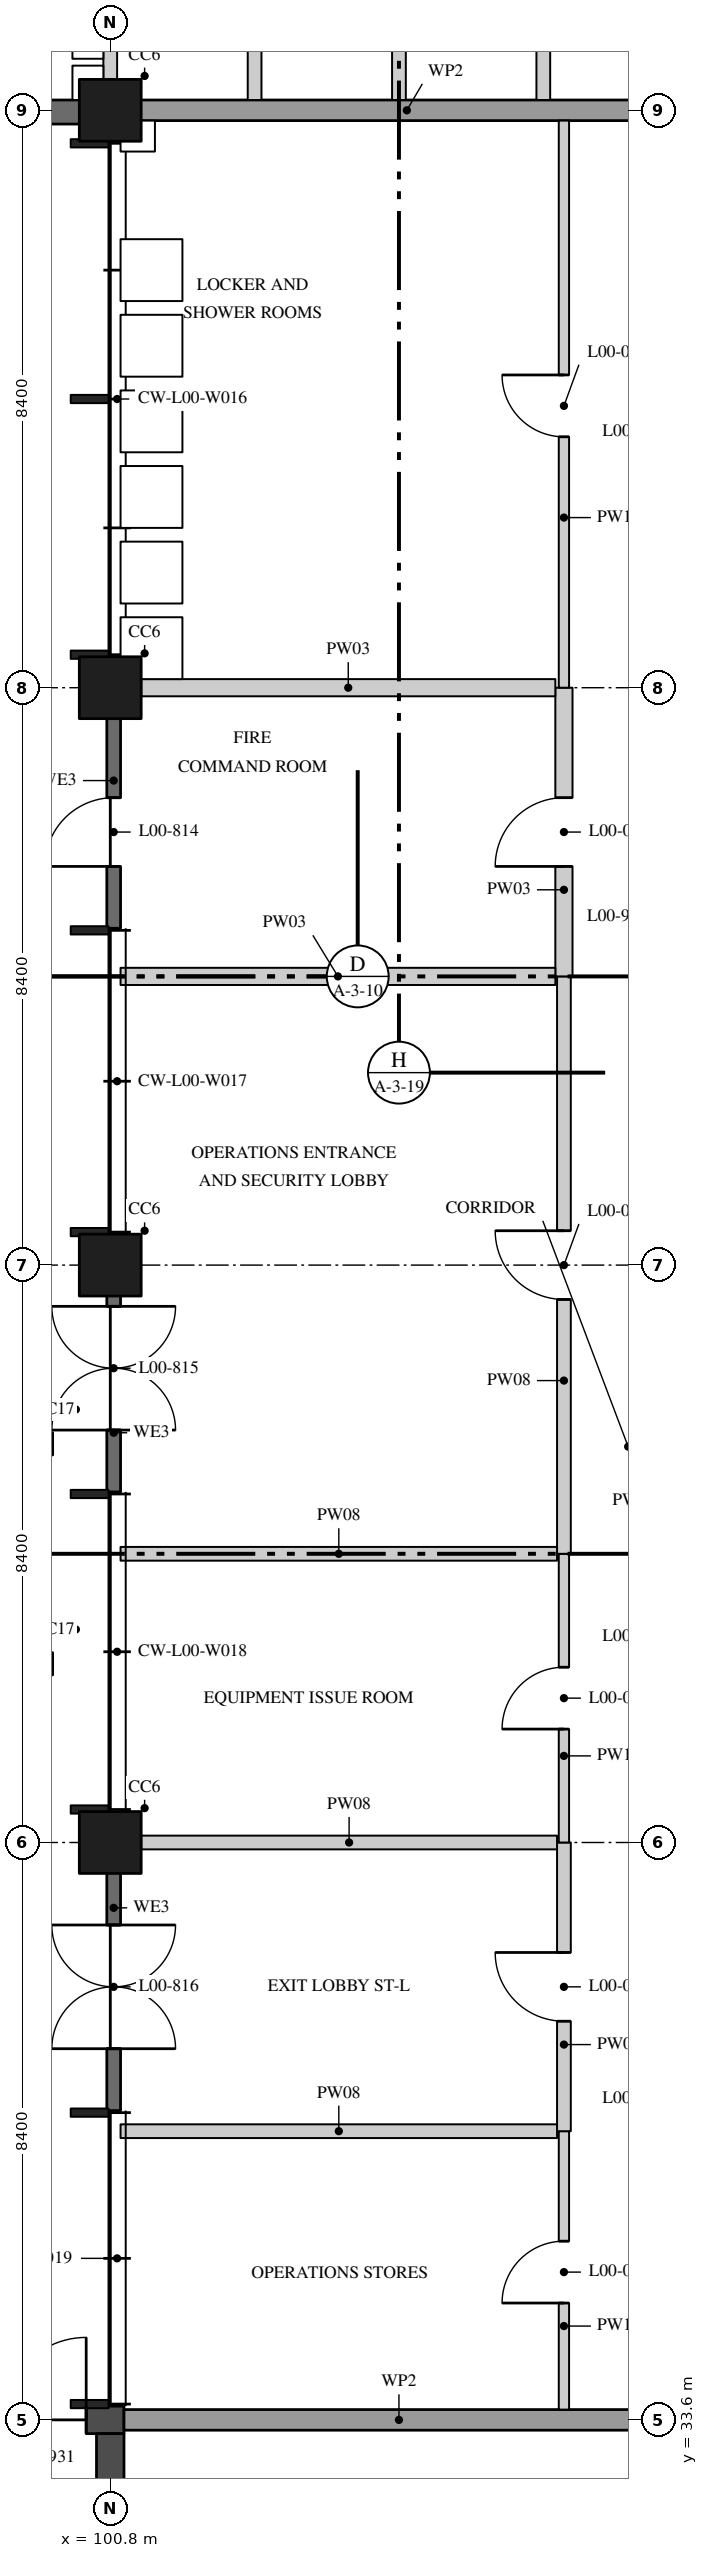
"""IFC4 building model, lengths in metres.
Left out: names, types, materials, properties, quantities, classifications, styles, units other than length and angle.
Written with IfcOpenShell. Run it as: python <this file> out.ifc"""

import sys

from ifc_helpers import new_model, si_unit, direction, frame, frame_2d, origin, origin_2d, place, context, subcontext, project, spatial, rectangle, hollow_circle, extrude, element, fill, save


model = new_model("IFC4")
c1 = context("Model", 3, precision=1e-05, world=origin(), true_north=direction((0.0, 1.0)))
c2 = subcontext(c1, "Body", "Model", "MODEL_VIEW")
j1 = project(units=[si_unit("LENGTHUNIT", "METRE"), si_unit("PLANEANGLEUNIT", "RADIAN")], contexts=[c1])
p1 = place(None, origin())
s1 = spatial("IfcSite", under=j1, at=p1, CompositionType="ELEMENT")
p2 = place(p1, origin())
s2 = spatial("IfcBuilding", under=s1, at=p2, CompositionType="ELEMENT")
p3 = place(p2, origin())
s3 = spatial("IfcBuildingStorey", under=s2, at=p3, CompositionType="ELEMENT", Elevation=0.0)
for number, where, z_axis, x_axis in (
    (1, (100.8, 42.0, 0.0), (0.0, 0.0, 1.0), (1.0, 0.0, 0.0)),
    (2, (100.8, 50.4, 0.0), (0.0, 0.0, 1.0), (1.0, 0.0, 0.0)),
    (3, (100.8, 58.8, 0.0), (0.0, 0.0, 1.0), (1.0, 0.0, 0.0)),
    (4, (100.8, 67.2, 0.0), (0.0, 0.0, 1.0), (1.0, 0.0, 0.0)),
):
    element("IfcColumn", number, at=place(p3, frame(where, z_axis=z_axis, x_axis=x_axis)), inside=s3, PredefinedType="COLUMN", context=c2, shape_type="SweptSolid", body=[
        extrude(rectangle(XDim=0.9, YDim=0.9, at=origin_2d()), origin(), (0.0, 0.0, 1.0), 5.05),
    ])
for number, where, z_axis, x_axis in (
    (5, (99.8, 44.6, 0.0), (0.0, 0.0, 1.0), (1.0, 0.0, 0.0)),
    (6, (99.8, 47.8, 0.0), (0.0, 0.0, 1.0), (1.0, 0.0, 0.0)),
):
    element("IfcColumn", number, at=place(p3, frame(where, z_axis=z_axis, x_axis=x_axis)), inside=s3, PredefinedType="COLUMN", context=c2, shape_type="SweptSolid", body=[
        extrude(hollow_circle(Radius=0.162, WallThickness=0.013, at=origin_2d()), origin(), (0.0, 0.0, 1.0), 4.495),
    ])
p4 = place(p3, frame((92.2, 33.6, 0.0), z_axis=(0.0, 0.0, 1.0), x_axis=(1.0, 0.0, 0.0)))
e7 = element("IfcWall", 7, at=p4, inside=s3, PredefinedType="SHEAR", context=c2, shape_type="SweptSolid", body=[
    extrude(rectangle(XDim=8.8, YDim=0.4, at=frame_2d((4.4, 0.0))), origin(), (0.0, 0.0, 1.0), 5.05),
])
p5 = place(p4, frame((7.05, 0.0, 0.0)))
e8 = element("IfcOpeningElement", 8, at=p5, cuts=e7, PredefinedType="OPENING", context=c2, shape_type="SweptSolid", body=[
    extrude(rectangle(XDim=1.2, YDim=2.1, at=frame_2d((0.6, 1.05))), frame((0.0, 0.21, 0.0), z_axis=(0.0, -1.0, 0.0), x_axis=(1.0, 0.0, 0.0)), (0.0, 0.0, 1.0), 0.42),
])
p6 = place(p3, frame((100.8, 25.4, 0.0), z_axis=(0.0, 0.0, 1.0), x_axis=(0.0, 1.0, 0.0)))
e9 = element("IfcWall", 9, at=p6, inside=s3, PredefinedType="SHEAR", context=c2, shape_type="SweptSolid", body=[
    extrude(rectangle(XDim=8.0, YDim=0.4, at=frame_2d((4.0, 0.0))), origin(), (0.0, 0.0, 1.0), 5.05),
])
p7 = place(p3, frame((107.4, 33.75, 0.0), z_axis=(0.0, 0.0, 1.0), x_axis=(0.0, 1.0, 0.0)))
e10 = element("IfcWall", 10, at=p7, inside=s3, PredefinedType="PARTITIONING", context=c2, shape_type="SweptSolid", body=[
    extrude(rectangle(XDim=4.05, YDim=0.15, at=frame_2d((2.025, 0.0))), origin(), (0.0, 0.0, 1.0), 5.05),
])
p8 = place(p7, frame((1.55, 0.0, 0.0)))
e11 = element("IfcOpeningElement", 11, at=p8, cuts=e10, PredefinedType="OPENING", context=c2, shape_type="SweptSolid", body=[
    extrude(rectangle(XDim=0.9, YDim=2.1, at=frame_2d((0.45, 1.05))), frame((0.0, 0.085, 0.0), z_axis=(0.0, -1.0, 0.0), x_axis=(1.0, 0.0, 0.0)), (0.0, 0.0, 1.0), 0.17),
])
p9 = place(p3, frame((107.4, 37.8, 0.0), z_axis=(0.0, 0.0, 1.0), x_axis=(0.0, 1.0, 0.0)))
e12 = element("IfcWall", 12, at=p9, inside=s3, PredefinedType="PARTITIONING", context=c2, shape_type="SweptSolid", body=[
    extrude(rectangle(XDim=4.2, YDim=0.2, at=frame_2d((2.1, 0.0))), origin(), (0.0, 0.0, 1.0), 5.05),
])
p10 = place(p9, frame((1.6, 0.0, 0.0)))
e13 = element("IfcOpeningElement", 13, at=p10, cuts=e12, PredefinedType="OPENING", context=c2, shape_type="SweptSolid", body=[
    extrude(rectangle(XDim=1.0, YDim=2.4, at=frame_2d((0.5, 1.2))), frame((0.0, 0.11, 0.0), z_axis=(0.0, -1.0, 0.0), x_axis=(1.0, 0.0, 0.0)), (0.0, 0.0, 1.0), 0.22),
])
p11 = place(p3, frame((107.4, 42.0, 0.0), z_axis=(0.0, 0.0, 1.0), x_axis=(0.0, 1.0, 0.0)))
e14 = element("IfcWall", 14, at=p11, inside=s3, PredefinedType="PARTITIONING", context=c2, shape_type="SweptSolid", body=[
    extrude(rectangle(XDim=4.2, YDim=0.15, at=frame_2d((2.1, 0.0))), origin(), (0.0, 0.0, 1.0), 5.05),
])
p12 = place(p11, frame((1.65, 0.0, 0.0)))
e15 = element("IfcOpeningElement", 15, at=p12, cuts=e14, PredefinedType="OPENING", context=c2, shape_type="SweptSolid", body=[
    extrude(rectangle(XDim=0.9, YDim=2.1, at=frame_2d((0.45, 1.05))), frame((0.0, 0.085, 0.0), z_axis=(0.0, -1.0, 0.0), x_axis=(1.0, 0.0, 0.0)), (0.0, 0.0, 1.0), 0.17),
])
p13 = place(p3, frame((107.4, 46.2, 0.0), z_axis=(0.0, 0.0, 1.0), x_axis=(0.0, 1.0, 0.0)))
e16 = element("IfcWall", 16, at=p13, inside=s3, PredefinedType="PARTITIONING", context=c2, shape_type="SweptSolid", body=[
    extrude(rectangle(XDim=8.4, YDim=0.2, at=frame_2d((4.2, 0.0))), origin(), (0.0, 0.0, 1.0), 5.05),
])
p14 = place(p13, frame((3.7, 0.0, 0.0)))
e17 = element("IfcOpeningElement", 17, at=p14, cuts=e16, PredefinedType="OPENING", context=c2, shape_type="SweptSolid", body=[
    extrude(rectangle(XDim=1.0, YDim=2.4, at=frame_2d((0.5, 1.2))), frame((0.0, 0.11, 0.0), z_axis=(0.0, -1.0, 0.0), x_axis=(1.0, 0.0, 0.0)), (0.0, 0.0, 1.0), 0.22),
])
p15 = place(p3, frame((107.4, 54.6, 0.0), z_axis=(0.0, 0.0, 1.0), x_axis=(0.0, 1.0, 0.0)))
e18 = element("IfcWall", 18, at=p15, inside=s3, PredefinedType="PARTITIONING", context=c2, shape_type="SweptSolid", body=[
    extrude(rectangle(XDim=4.2, YDim=0.25, at=frame_2d((2.1, 0.0))), origin(), (0.0, 0.0, 1.0), 5.05),
])
p16 = place(p15, frame((1.6, 0.0, 0.0)))
e19 = element("IfcOpeningElement", 19, at=p16, cuts=e18, PredefinedType="OPENING", context=c2, shape_type="SweptSolid", body=[
    extrude(rectangle(XDim=1.0, YDim=2.1, at=frame_2d((0.5, 1.05))), frame((0.0, 0.135, 0.0), z_axis=(0.0, -1.0, 0.0), x_axis=(1.0, 0.0, 0.0)), (0.0, 0.0, 1.0), 0.27),
])
p17 = place(p3, frame((107.4, 58.8, 0.0), z_axis=(0.0, 0.0, 1.0), x_axis=(0.0, 1.0, 0.0)))
e20 = element("IfcWall", 20, at=p17, inside=s3, PredefinedType="PARTITIONING", context=c2, shape_type="SweptSolid", body=[
    extrude(rectangle(XDim=8.25, YDim=0.15, at=frame_2d((4.125, 0.0))), origin(), (0.0, 0.0, 1.0), 5.05),
])
p18 = place(p17, frame((3.65, 0.0, 0.0)))
e21 = element("IfcOpeningElement", 21, at=p18, cuts=e20, PredefinedType="OPENING", context=c2, shape_type="SweptSolid", body=[
    extrude(rectangle(XDim=0.9, YDim=2.1, at=frame_2d((0.45, 1.05))), frame((0.0, 0.085, 0.0), z_axis=(0.0, -1.0, 0.0), x_axis=(1.0, 0.0, 0.0)), (0.0, 0.0, 1.0), 0.17),
])
p19 = place(p3, frame((100.95, 37.8, 0.0), z_axis=(0.0, 0.0, 1.0), x_axis=(1.0, 0.0, 0.0)))
e22 = element("IfcWall", 22, at=p19, inside=s3, PredefinedType="PARTITIONING", context=c2, shape_type="SweptSolid", body=[
    extrude(rectangle(XDim=6.35, YDim=0.2, at=frame_2d((3.175, 0.0))), origin(), (0.0, 0.0, 1.0), 5.05),
])
p20 = place(p3, frame((101.25, 42.0, 0.0), z_axis=(0.0, 0.0, 1.0), x_axis=(1.0, 0.0, 0.0)))
e23 = element("IfcWall", 23, at=p20, inside=s3, PredefinedType="PARTITIONING", context=c2, shape_type="SweptSolid", body=[
    extrude(rectangle(XDim=6.05, YDim=0.2, at=frame_2d((3.025, 0.0))), origin(), (0.0, 0.0, 1.0), 5.05),
])
p21 = place(p3, frame((100.95, 46.2, 0.0), z_axis=(0.0, 0.0, 1.0), x_axis=(1.0, 0.0, 0.0)))
e24 = element("IfcWall", 24, at=p21, inside=s3, PredefinedType="PARTITIONING", context=c2, shape_type="SweptSolid", body=[
    extrude(rectangle(XDim=6.35, YDim=0.2, at=frame_2d((3.175, 0.0))), origin(), (0.0, 0.0, 1.0), 5.05),
])
p22 = place(p3, frame((100.95, 54.6, 0.0), z_axis=(0.0, 0.0, 1.0), x_axis=(1.0, 0.0, 0.0)))
e25 = element("IfcWall", 25, at=p22, inside=s3, PredefinedType="PARTITIONING", context=c2, shape_type="SweptSolid", body=[
    extrude(rectangle(XDim=6.325, YDim=0.25, at=frame_2d((3.163, 0.0))), origin(), (0.0, 0.0, 1.0), 5.05),
])
p23 = place(p3, frame((101.25, 58.8, 0.0), z_axis=(0.0, 0.0, 1.0), x_axis=(1.0, 0.0, 0.0)))
e26 = element("IfcWall", 26, at=p23, inside=s3, PredefinedType="PARTITIONING", context=c2, shape_type="SweptSolid", body=[
    extrude(rectangle(XDim=6.025, YDim=0.25, at=frame_2d((3.012, 0.0))), origin(), (0.0, 0.0, 1.0), 5.05),
])
p24 = place(p3, frame((102.9, 67.35, 0.0), z_axis=(0.0, 0.0, 1.0), x_axis=(0.0, 1.0, 0.0)))
e27 = element("IfcWall", 27, at=p24, inside=s3, PredefinedType="PARTITIONING", context=c2, shape_type="SweptSolid", body=[
    extrude(rectangle(XDim=3.05, YDim=0.2, at=frame_2d((1.525, 0.0))), origin(), (0.0, 0.0, 1.0), 5.05),
])
p25 = place(p3, frame((100.8, 67.65, 0.0), z_axis=(0.0, 0.0, 1.0), x_axis=(0.0, 1.0, 0.0)))
e28 = element("IfcWall", 28, at=p25, inside=s3, PredefinedType="PARTITIONING", context=c2, shape_type="SweptSolid", body=[
    extrude(rectangle(XDim=2.75, YDim=0.2, at=frame_2d((1.375, 0.0))), origin(), (0.0, 0.0, 1.0), 5.05),
])
for number, where, z_axis, x_axis in (
    (29, (105.0, 67.35, 0.0), (0.0, 0.0, 1.0), (0.0, 1.0, 0.0)),
    (30, (107.1, 67.35, 0.0), (0.0, 0.0, 1.0), (0.0, 1.0, 0.0)),
):
    element("IfcWall", number, at=place(p3, frame(where, z_axis=z_axis, x_axis=x_axis)), inside=s3, PredefinedType="PARTITIONING", context=c2, shape_type="SweptSolid", body=[
        extrude(rectangle(XDim=3.05, YDim=0.2, at=frame_2d((1.525, 0.0))), origin(), (0.0, 0.0, 1.0), 5.05),
    ])
p26 = place(p3, frame((92.6, 67.175, 0.0), z_axis=(0.0, 0.0, 1.0), x_axis=(1.0, 0.0, 0.0)))
e31 = element("IfcWall", 31, at=p26, inside=s3, PredefinedType="SOLIDWALL", context=c2, shape_type="SweptSolid", body=[
    extrude(rectangle(XDim=7.77, YDim=0.35, at=frame_2d((3.885, 0.0))), origin(), (0.0, 0.0, 1.0), 5.05),
])
p27 = place(p26, frame((0.4, 0.0, 1.5)))
e32 = element("IfcOpeningElement", 32, at=p27, cuts=e31, PredefinedType="OPENING", context=c2, shape_type="SweptSolid", body=[
    extrude(rectangle(XDim=0.9, YDim=1.2, at=frame_2d((0.45, 0.6))), frame((0.0, 0.185, 0.0), z_axis=(0.0, -1.0, 0.0), x_axis=(1.0, 0.0, 0.0)), (0.0, 0.0, 1.0), 0.37),
])
p28 = place(p26, frame((2.5, 0.0, 1.5)))
e33 = element("IfcOpeningElement", 33, at=p28, cuts=e31, PredefinedType="OPENING", context=c2, shape_type="SweptSolid", body=[
    extrude(rectangle(XDim=0.9, YDim=1.2, at=frame_2d((0.45, 0.6))), frame((0.0, 0.185, 0.0), z_axis=(0.0, -1.0, 0.0), x_axis=(1.0, 0.0, 0.0)), (0.0, 0.0, 1.0), 0.37),
])
p29 = place(p26, frame((4.6, 0.0, 1.5)))
e34 = element("IfcOpeningElement", 34, at=p29, cuts=e31, PredefinedType="OPENING", context=c2, shape_type="SweptSolid", body=[
    extrude(rectangle(XDim=0.9, YDim=1.2, at=frame_2d((0.45, 0.6))), frame((0.0, 0.185, 0.0), z_axis=(0.0, -1.0, 0.0), x_axis=(1.0, 0.0, 0.0)), (0.0, 0.0, 1.0), 0.37),
])
p30 = place(p3, frame((100.85, 58.37, 0.0), z_axis=(0.0, 0.0, 1.0), x_axis=(0.0, -1.0, 0.0)))
e35 = element("IfcWall", 35, at=p30, inside=s3, PredefinedType="SOLIDWALL", context=c2, shape_type="SweptSolid", body=[
    extrude(rectangle(XDim=3.07, YDim=0.2, at=frame_2d((1.535, 0.0))), origin(), (0.0, 0.0, 1.0), 5.05),
])
p31 = place(p30, frame((1.17, 0.0, 0.0)))
e36 = element("IfcOpeningElement", 36, at=p31, cuts=e35, PredefinedType="OPENING", context=c2, shape_type="SweptSolid", body=[
    extrude(rectangle(XDim=1.0, YDim=2.4, at=frame_2d((0.5, 1.2))), frame((0.0, 0.11, 0.0), z_axis=(0.0, -1.0, 0.0), x_axis=(1.0, 0.0, 0.0)), (0.0, 0.0, 1.0), 0.22),
])
p32 = place(p3, frame((100.85, 49.97, 0.0), z_axis=(0.0, 0.0, 1.0), x_axis=(0.0, -1.0, 0.0)))
e37 = element("IfcWall", 37, at=p32, inside=s3, PredefinedType="SOLIDWALL", context=c2, shape_type="SweptSolid", body=[
    extrude(rectangle(XDim=2.87, YDim=0.2, at=frame_2d((1.435, 0.0))), origin(), (0.0, 0.0, 1.0), 5.05),
])
p33 = place(p32, frame((0.17, 0.0, 0.0)))
e38 = element("IfcOpeningElement", 38, at=p33, cuts=e37, PredefinedType="OPENING", context=c2, shape_type="SweptSolid", body=[
    extrude(rectangle(XDim=1.8, YDim=2.4, at=frame_2d((0.9, 1.2))), frame((0.0, 0.11, 0.0), z_axis=(0.0, -1.0, 0.0), x_axis=(1.0, 0.0, 0.0)), (0.0, 0.0, 1.0), 0.22),
])
p34 = place(p3, frame((100.85, 41.57, 0.0), z_axis=(0.0, 0.0, 1.0), x_axis=(0.0, -1.0, 0.0)))
e39 = element("IfcWall", 39, at=p34, inside=s3, PredefinedType="SOLIDWALL", context=c2, shape_type="SweptSolid", body=[
    extrude(rectangle(XDim=3.47, YDim=0.2, at=frame_2d((1.735, 0.0))), origin(), (0.0, 0.0, 1.0), 5.05),
])
p35 = place(p34, frame((0.77, 0.0, 0.0)))
e40 = element("IfcOpeningElement", 40, at=p35, cuts=e39, PredefinedType="OPENING", context=c2, shape_type="SweptSolid", body=[
    extrude(rectangle(XDim=1.8, YDim=2.4, at=frame_2d((0.9, 1.2))), frame((0.0, 0.11, 0.0), z_axis=(0.0, -1.0, 0.0), x_axis=(1.0, 0.0, 0.0)), (0.0, 0.0, 1.0), 0.22),
])
p36 = place(p3, frame((109.0, 33.6, 0.0), z_axis=(0.0, 0.0, 1.0), x_axis=(-1.0, 0.0, 0.0)))
e41 = element("IfcWall", 41, at=p36, inside=s3, PredefinedType="SOLIDWALL", context=c2, shape_type="SweptSolid", body=[
    extrude(rectangle(XDim=8.0, YDim=0.3, at=frame_2d((4.0, 0.0))), origin(), (0.0, 0.0, 1.0), 5.05),
])
p37 = place(p3, frame((109.0, 67.2, 0.0), z_axis=(0.0, 0.0, 1.0), x_axis=(-1.0, 0.0, 0.0)))
e42 = element("IfcWall", 42, at=p37, inside=s3, PredefinedType="SOLIDWALL", context=c2, shape_type="SweptSolid", body=[
    extrude(rectangle(XDim=7.77, YDim=0.3, at=frame_2d((3.885, 0.0))), origin(), (0.0, 0.0, 1.0), 5.05),
])
p38 = place(p5, origin())
e43 = element("IfcDoor", 43, at=p38, inside=s3, OperationType="SINGLE_SWING_LEFT", PredefinedType="DOOR", context=c2, shape_type="SweptSolid", body=[
    extrude(rectangle(XDim=1.2, YDim=2.1, at=frame_2d((0.6, 1.05))), frame((0.0, 0.035, 0.0), z_axis=(0.0, -1.0, 0.0), x_axis=(1.0, 0.0, 0.0)), (0.0, 0.0, 1.0), 0.07),
])
fill(e8, e43)
p39 = place(p8, origin())
e44 = element("IfcDoor", 44, at=p39, inside=s3, OperationType="SINGLE_SWING_RIGHT", PredefinedType="DOOR", context=c2, shape_type="SweptSolid", body=[
    extrude(rectangle(XDim=0.9, YDim=2.1, at=frame_2d((0.45, 1.05))), frame((0.0, 0.025, 0.0), z_axis=(0.0, -1.0, 0.0), x_axis=(1.0, 0.0, 0.0)), (0.0, 0.0, 1.0), 0.05),
])
fill(e11, e44)
p40 = place(p10, origin())
e45 = element("IfcDoor", 45, at=p40, inside=s3, OperationType="SINGLE_SWING_LEFT", PredefinedType="DOOR", context=c2, shape_type="SweptSolid", body=[
    extrude(rectangle(XDim=1.0, YDim=2.4, at=frame_2d((0.5, 1.2))), frame((0.0, 0.03, 0.0), z_axis=(0.0, -1.0, 0.0), x_axis=(1.0, 0.0, 0.0)), (0.0, 0.0, 1.0), 0.06),
])
fill(e13, e45)
p41 = place(p12, origin())
e46 = element("IfcDoor", 46, at=p41, inside=s3, OperationType="SINGLE_SWING_RIGHT", PredefinedType="DOOR", context=c2, shape_type="SweptSolid", body=[
    extrude(rectangle(XDim=0.9, YDim=2.1, at=frame_2d((0.45, 1.05))), frame((0.0, 0.025, 0.0), z_axis=(0.0, -1.0, 0.0), x_axis=(1.0, 0.0, 0.0)), (0.0, 0.0, 1.0), 0.05),
])
fill(e15, e46)
p42 = place(p14, origin())
e47 = element("IfcDoor", 47, at=p42, inside=s3, OperationType="SINGLE_SWING_LEFT", PredefinedType="DOOR", context=c2, shape_type="SweptSolid", body=[
    extrude(rectangle(XDim=1.0, YDim=2.4, at=frame_2d((0.5, 1.2))), frame((0.0, 0.03, 0.0), z_axis=(0.0, -1.0, 0.0), x_axis=(1.0, 0.0, 0.0)), (0.0, 0.0, 1.0), 0.06),
])
fill(e17, e47)
p43 = place(p16, origin())
e48 = element("IfcDoor", 48, at=p43, inside=s3, OperationType="SINGLE_SWING_RIGHT", PredefinedType="DOOR", context=c2, shape_type="SweptSolid", body=[
    extrude(rectangle(XDim=1.0, YDim=2.1, at=frame_2d((0.5, 1.05))), frame((0.0, 0.05, 0.0), z_axis=(0.0, -1.0, 0.0), x_axis=(1.0, 0.0, 0.0)), (0.0, 0.0, 1.0), 0.1),
])
fill(e19, e48)
p44 = place(p18, origin())
e49 = element("IfcDoor", 49, at=p44, inside=s3, OperationType="SINGLE_SWING_LEFT", PredefinedType="DOOR", context=c2, shape_type="SweptSolid", body=[
    extrude(rectangle(XDim=0.9, YDim=2.1, at=frame_2d((0.45, 1.05))), frame((0.0, 0.025, 0.0), z_axis=(0.0, -1.0, 0.0), x_axis=(1.0, 0.0, 0.0)), (0.0, 0.0, 1.0), 0.05),
])
fill(e21, e49)
p45 = place(p31, frame((1.0, 0.0, 0.0), z_axis=(0.0, 0.0, 1.0), x_axis=(-1.0, 0.0, 0.0)))
e50 = element("IfcDoor", 50, at=p45, inside=s3, OperationType="SINGLE_SWING_RIGHT", PredefinedType="DOOR", context=c2, shape_type="SweptSolid", body=[
    extrude(rectangle(XDim=1.0, YDim=2.4, at=frame_2d((0.5, 1.2))), frame((0.0, 0.025, 0.0), z_axis=(0.0, -1.0, 0.0), x_axis=(1.0, 0.0, 0.0)), (0.0, 0.0, 1.0), 0.05),
])
fill(e36, e50)
p46 = place(p33, frame((1.8, 0.0, 0.0), z_axis=(0.0, 0.0, 1.0), x_axis=(-1.0, 0.0, 0.0)))
e51 = element("IfcDoor", 51, at=p46, inside=s3, OperationType="DOUBLE_DOOR_DOUBLE_SWING", PredefinedType="DOOR", context=c2, shape_type="SweptSolid", body=[
    extrude(rectangle(XDim=1.8, YDim=2.4, at=frame_2d((0.9, 1.2))), frame((0.0, 0.025, 0.0), z_axis=(0.0, -1.0, 0.0), x_axis=(1.0, 0.0, 0.0)), (0.0, 0.0, 1.0), 0.05),
])
fill(e38, e51)
p47 = place(p35, frame((1.8, 0.0, 0.0), z_axis=(0.0, 0.0, 1.0), x_axis=(-1.0, 0.0, 0.0)))
e52 = element("IfcDoor", 52, at=p47, inside=s3, OperationType="DOUBLE_DOOR_DOUBLE_SWING", PredefinedType="DOOR", context=c2, shape_type="SweptSolid", body=[
    extrude(rectangle(XDim=1.8, YDim=2.4, at=frame_2d((0.9, 1.2))), frame((0.0, 0.025, 0.0), z_axis=(0.0, -1.0, 0.0), x_axis=(1.0, 0.0, 0.0)), (0.0, 0.0, 1.0), 0.05),
])
fill(e40, e52)
save(model, sys.argv[1])
